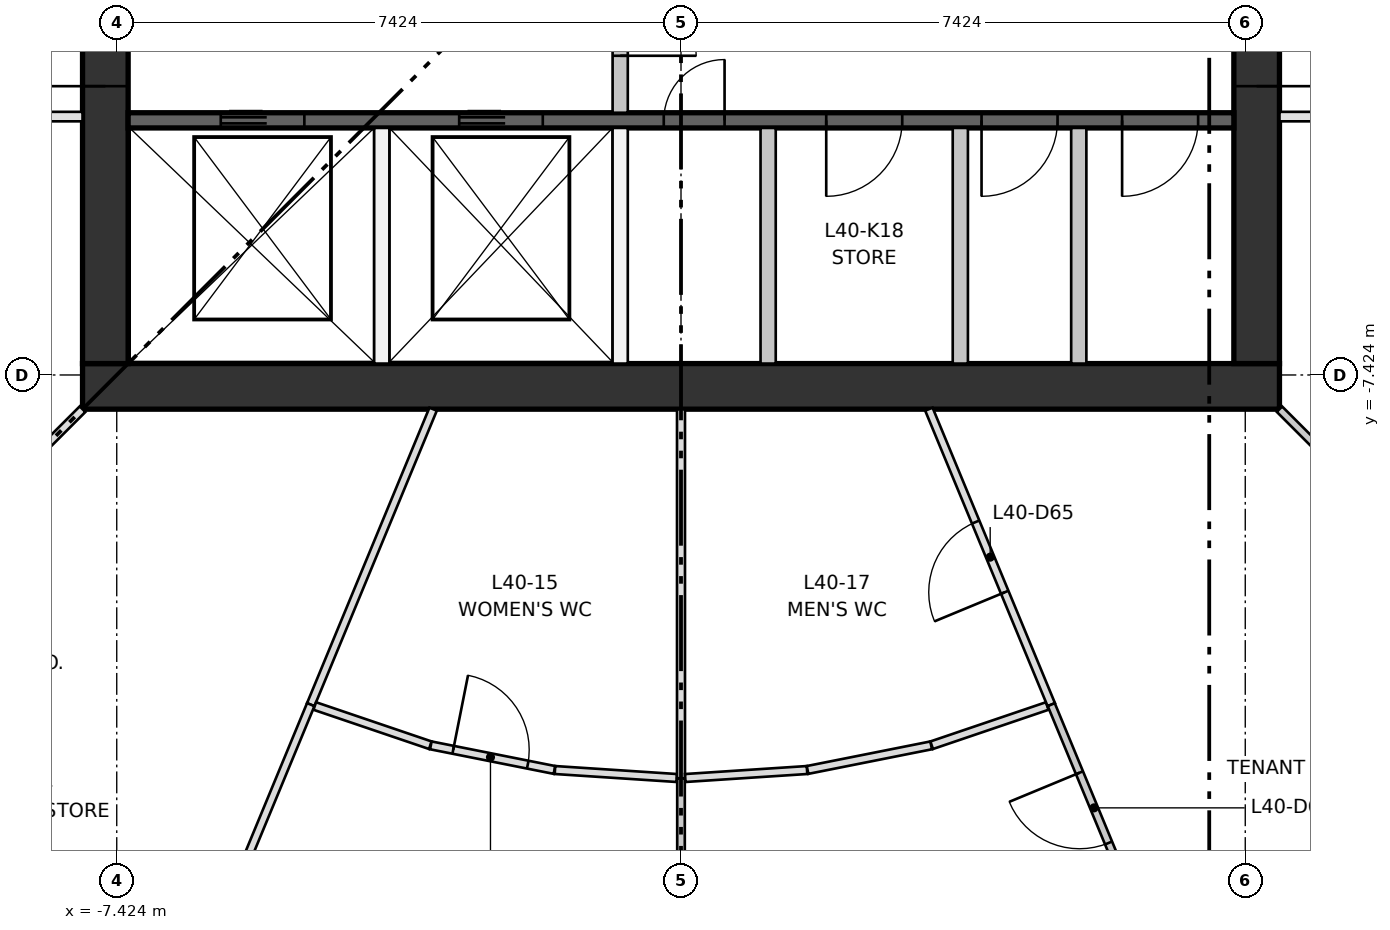
"""IFC4 building model, lengths in metres.
Left out: names, types, materials, properties, quantities, classifications, styles, units other than length and angle.
Written with IfcOpenShell. Run it as: python <this file> out.ifc"""

import sys

from ifc_helpers import new_model, si_unit, direction, frame, frame_2d, origin, place, context, subcontext, project, spatial, rectangle, extrude, element, fill, save


model = new_model("IFC4")
c1 = context("Model", 3, precision=1e-05, world=origin(), true_north=direction((0.0, 1.0)))
c2 = subcontext(c1, "Body", "Model", "MODEL_VIEW")
j1 = project(units=[si_unit("LENGTHUNIT", "METRE"), si_unit("PLANEANGLEUNIT", "RADIAN")], contexts=[c1])
p1 = place(None, origin())
s1 = spatial("IfcSite", under=j1, at=p1, CompositionType="ELEMENT")
p2 = place(p1, origin())
s2 = spatial("IfcBuilding", under=s1, at=p2, CompositionType="ELEMENT")
p3 = place(p2, frame((0.0, 0.0, 151.1)))
s3 = spatial("IfcBuildingStorey", under=s2, at=p3, CompositionType="ELEMENT", Elevation=151.1)
p4 = place(p3, frame((-7.874, -7.574, 0.0), z_axis=(0.0, 0.0, 1.0), x_axis=(1.0, 0.0, 0.0)))
e1 = element("IfcWall", 1, at=p4, inside=s3, PredefinedType="SHEAR", context=c2, shape_type="SweptSolid", body=[
    extrude(rectangle(XDim=15.748, YDim=0.6, at=frame_2d((7.874, 0.0))), origin(), (0.0, 0.0, 1.0), 3.35),
])
p5 = place(p3, frame((-7.574, -7.274, 0.0), z_axis=(0.0, 0.0, 1.0), x_axis=(0.0, 1.0, 0.0)))
e2 = element("IfcWall", 2, at=p5, inside=s3, PredefinedType="SHEAR", context=c2, shape_type="SweptSolid", body=[
    extrude(rectangle(XDim=14.548, YDim=0.6, at=frame_2d((7.274, 0.0))), origin(), (0.0, 0.0, 1.0), 3.35),
])
p6 = place(p5, frame((6.774, 0.0, 0.0)))
e3 = element("IfcOpeningElement", 3, at=p6, cuts=e2, PredefinedType="OPENING", context=c2, shape_type="SweptSolid", body=[
    extrude(rectangle(XDim=1.0, YDim=2.1, at=frame_2d((0.5, 1.05))), frame((0.0, 0.31, 0.0), z_axis=(0.0, -1.0, 0.0), x_axis=(1.0, 0.0, 0.0)), (0.0, 0.0, 1.0), 0.62),
])
p7 = place(p5, frame((3.649, 0.0, 0.0)))
e4 = element("IfcOpeningElement", 4, at=p7, cuts=e2, PredefinedType="OPENING", context=c2, shape_type="SweptSolid", body=[
    extrude(rectangle(XDim=1.8, YDim=2.1, at=frame_2d((0.9, 1.05))), frame((0.0, 0.31, 0.0), z_axis=(0.0, -1.0, 0.0), x_axis=(1.0, 0.0, 0.0)), (0.0, 0.0, 1.0), 0.62),
])
p8 = place(p5, frame((9.098, 0.0, 0.0)))
e5 = element("IfcOpeningElement", 5, at=p8, cuts=e2, PredefinedType="OPENING", context=c2, shape_type="SweptSolid", body=[
    extrude(rectangle(XDim=1.8, YDim=2.1, at=frame_2d((0.9, 1.05))), frame((0.0, 0.31, 0.0), z_axis=(0.0, -1.0, 0.0), x_axis=(1.0, 0.0, 0.0)), (0.0, 0.0, 1.0), 0.62),
])
p9 = place(p3, frame((7.574, -7.274, 0.0), z_axis=(0.0, 0.0, 1.0), x_axis=(0.0, 1.0, 0.0)))
e6 = element("IfcWall", 6, at=p9, inside=s3, PredefinedType="SHEAR", context=c2, shape_type="SweptSolid", body=[
    extrude(rectangle(XDim=14.548, YDim=0.6, at=frame_2d((7.274, 0.0))), origin(), (0.0, 0.0, 1.0), 3.35),
])
p10 = place(p9, frame((6.774, 0.0, 0.0)))
e7 = element("IfcOpeningElement", 7, at=p10, cuts=e6, PredefinedType="OPENING", context=c2, shape_type="SweptSolid", body=[
    extrude(rectangle(XDim=1.0, YDim=2.1, at=frame_2d((0.5, 1.05))), frame((0.0, 0.31, 0.0), z_axis=(0.0, -1.0, 0.0), x_axis=(1.0, 0.0, 0.0)), (0.0, 0.0, 1.0), 0.62),
])
p11 = place(p9, frame((3.649, 0.0, 0.0)))
e8 = element("IfcOpeningElement", 8, at=p11, cuts=e6, PredefinedType="OPENING", context=c2, shape_type="SweptSolid", body=[
    extrude(rectangle(XDim=1.8, YDim=2.1, at=frame_2d((0.9, 1.05))), frame((0.0, 0.31, 0.0), z_axis=(0.0, -1.0, 0.0), x_axis=(1.0, 0.0, 0.0)), (0.0, 0.0, 1.0), 0.62),
])
p12 = place(p9, frame((9.098, 0.0, 0.0)))
e9 = element("IfcOpeningElement", 9, at=p12, cuts=e6, PredefinedType="OPENING", context=c2, shape_type="SweptSolid", body=[
    extrude(rectangle(XDim=1.8, YDim=2.1, at=frame_2d((0.9, 1.05))), frame((0.0, 0.31, 0.0), z_axis=(0.0, -1.0, 0.0), x_axis=(1.0, 0.0, 0.0)), (0.0, 0.0, 1.0), 0.62),
])
p13 = place(p3, frame((-7.274, -4.074, 0.0), z_axis=(0.0, 0.0, 1.0), x_axis=(1.0, 0.0, 0.0)))
e10 = element("IfcWall", 10, at=p13, inside=s3, PredefinedType="SHEAR", context=c2, shape_type="SweptSolid", body=[
    extrude(rectangle(XDim=14.548, YDim=0.2, at=frame_2d((7.274, 0.0))), origin(), (0.0, 0.0, 1.0), 3.0),
])
p14 = place(p13, frame((1.219, 0.0, 0.0)))
e11 = element("IfcOpeningElement", 11, at=p14, cuts=e10, PredefinedType="OPENING", context=c2, shape_type="SweptSolid", body=[
    extrude(rectangle(XDim=1.1, YDim=2.1, at=frame_2d((0.55, 1.05))), frame((0.0, 0.11, 0.0), z_axis=(0.0, -1.0, 0.0), x_axis=(1.0, 0.0, 0.0)), (0.0, 0.0, 1.0), 0.22),
])
p15 = place(p13, frame((4.355, 0.0, 0.0)))
e12 = element("IfcOpeningElement", 12, at=p15, cuts=e10, PredefinedType="OPENING", context=c2, shape_type="SweptSolid", body=[
    extrude(rectangle(XDim=1.1, YDim=2.1, at=frame_2d((0.55, 1.05))), frame((0.0, 0.11, 0.0), z_axis=(0.0, -1.0, 0.0), x_axis=(1.0, 0.0, 0.0)), (0.0, 0.0, 1.0), 0.22),
])
p16 = place(p13, frame((7.047, 0.0, 0.0)))
e13 = element("IfcOpeningElement", 13, at=p16, cuts=e10, PredefinedType="OPENING", context=c2, shape_type="SweptSolid", body=[
    extrude(rectangle(XDim=0.8, YDim=2.1, at=frame_2d((0.4, 1.05))), frame((0.0, 0.11, 0.0), z_axis=(0.0, -1.0, 0.0), x_axis=(1.0, 0.0, 0.0)), (0.0, 0.0, 1.0), 0.22),
])
p17 = place(p13, frame((9.185, 0.0, 0.0)))
e14 = element("IfcOpeningElement", 14, at=p17, cuts=e10, PredefinedType="OPENING", context=c2, shape_type="SweptSolid", body=[
    extrude(rectangle(XDim=1.0, YDim=2.1, at=frame_2d((0.5, 1.05))), frame((0.0, 0.11, 0.0), z_axis=(0.0, -1.0, 0.0), x_axis=(1.0, 0.0, 0.0)), (0.0, 0.0, 1.0), 0.22),
])
p18 = place(p13, frame((11.228, 0.0, 0.0)))
e15 = element("IfcOpeningElement", 15, at=p18, cuts=e10, PredefinedType="OPENING", context=c2, shape_type="SweptSolid", body=[
    extrude(rectangle(XDim=1.0, YDim=2.1, at=frame_2d((0.5, 1.05))), frame((0.0, 0.11, 0.0), z_axis=(0.0, -1.0, 0.0), x_axis=(1.0, 0.0, 0.0)), (0.0, 0.0, 1.0), 0.22),
])
p19 = place(p13, frame((13.078, 0.0, 0.0)))
e16 = element("IfcOpeningElement", 16, at=p19, cuts=e10, PredefinedType="OPENING", context=c2, shape_type="SweptSolid", body=[
    extrude(rectangle(XDim=1.0, YDim=2.1, at=frame_2d((0.5, 1.05))), frame((0.0, 0.11, 0.0), z_axis=(0.0, -1.0, 0.0), x_axis=(1.0, 0.0, 0.0)), (0.0, 0.0, 1.0), 0.22),
])
for number, where, z_axis, x_axis in (
    (17, (-3.937, -7.274, 0.0), (0.0, 0.0, 1.0), (0.0, 1.0, 0.0)),
    (18, (-0.8, -7.274, 0.0), (0.0, 0.0, 1.0), (0.0, 1.0, 0.0)),
):
    element("IfcWall", number, at=place(p3, frame(where, z_axis=z_axis, x_axis=x_axis)), inside=s3, PredefinedType="PARTITIONING", context=c2, shape_type="SweptSolid", body=[
        extrude(rectangle(XDim=3.1, YDim=0.2, at=frame_2d((1.55, 0.0))), origin(), (0.0, 0.0, 1.0), 3.0),
    ])
p20 = place(p3, frame((-0.8, -3.974, 0.0), z_axis=(0.0, 0.0, 1.0), x_axis=(0.0, 1.0, 0.0)))
e19 = element("IfcWall", 19, at=p20, inside=s3, PredefinedType="PARTITIONING", context=c2, shape_type="SweptSolid", body=[
    extrude(rectangle(XDim=2.499, YDim=0.2, at=frame_2d((1.25, 0.0))), origin(), (0.0, 0.0, 1.0), 3.0),
])
p21 = place(p20, frame((0.75, 0.0, 0.0)))
e20 = element("IfcOpeningElement", 20, at=p21, cuts=e19, PredefinedType="OPENING", context=c2, shape_type="SweptSolid", body=[
    extrude(rectangle(XDim=1.0, YDim=2.1, at=frame_2d((0.5, 1.05))), frame((0.0, 0.11, 0.0), z_axis=(0.0, -1.0, 0.0), x_axis=(1.0, 0.0, 0.0)), (0.0, 0.0, 1.0), 0.22),
])
for number, where, z_axis, x_axis in (
    (21, (1.146, -7.274, 0.0), (0.0, 0.0, 1.0), (0.0, 1.0, 0.0)),
    (22, (3.675, -7.274, 0.0), (0.0, 0.0, 1.0), (0.0, 1.0, 0.0)),
    (23, (5.233, -7.274, 0.0), (0.0, 0.0, 1.0), (0.0, 1.0, 0.0)),
):
    element("IfcWall", number, at=place(p3, frame(where, z_axis=z_axis, x_axis=x_axis)), inside=s3, PredefinedType="PARTITIONING", context=c2, shape_type="SweptSolid", body=[
        extrude(rectangle(XDim=3.1, YDim=0.2, at=frame_2d((1.55, 0.0))), origin(), (0.0, 0.0, 1.0), 3.0),
    ])
p22 = place(p3, frame((12.91, -4.024, 0.0), z_axis=(0.0, 0.0, 1.0), x_axis=(-1.0, 0.0, 0.0)))
e24 = element("IfcWall", 24, at=p22, inside=s3, PredefinedType="PARTITIONING", context=c2, shape_type="SweptSolid", body=[
    extrude(rectangle(XDim=5.036, YDim=0.125, at=frame_2d((2.518, 0.0))), origin(), (0.0, 0.0, 1.0), 3.0),
])
p23 = place(p22, frame((2.0, 0.0, 0.0)))
e25 = element("IfcOpeningElement", 25, at=p23, cuts=e24, PredefinedType="OPENING", context=c2, shape_type="SweptSolid", body=[
    extrude(rectangle(XDim=1.0, YDim=2.1, at=frame_2d((0.5, 1.05))), frame((0.0, 0.073, 0.0), z_axis=(0.0, -1.0, 0.0), x_axis=(1.0, 0.0, 0.0)), (0.0, 0.0, 1.0), 0.145),
])
p24 = place(p3, frame((-7.874, -4.024, 0.0), z_axis=(0.0, 0.0, 1.0), x_axis=(-1.0, 0.0, 0.0)))
e26 = element("IfcWall", 26, at=p24, inside=s3, PredefinedType="PARTITIONING", context=c2, shape_type="SweptSolid", body=[
    extrude(rectangle(XDim=3.771, YDim=0.125, at=frame_2d((1.886, 0.0))), origin(), (0.0, 0.0, 1.0), 3.0),
])
p25 = place(p24, frame((1.2, 0.0, 0.0)))
e27 = element("IfcOpeningElement", 27, at=p25, cuts=e26, PredefinedType="OPENING", context=c2, shape_type="SweptSolid", body=[
    extrude(rectangle(XDim=1.0, YDim=2.1, at=frame_2d((0.5, 1.05))), frame((0.0, 0.073, 0.0), z_axis=(0.0, -1.0, 0.0), x_axis=(1.0, 0.0, 0.0)), (0.0, 0.0, 1.0), 0.145),
])
p26 = place(p3, frame((-7.874, -7.874, 0.0), z_axis=(0.0, 0.0, 1.0), x_axis=(-0.707106781187, -0.707106781187, 0.0)))
e28 = element("IfcWall", 28, at=p26, inside=s3, PredefinedType="PARTITIONING", context=c2, shape_type="SweptSolid", body=[
    extrude(rectangle(XDim=6.564, YDim=0.105, at=frame_2d((3.282, 0.0))), origin(), (0.0, 0.0, 1.0), 3.0),
])
p27 = place(p26, frame((2.5, 0.0, 0.0)))
e29 = element("IfcOpeningElement", 29, at=p27, cuts=e28, PredefinedType="OPENING", context=c2, shape_type="SweptSolid", body=[
    extrude(rectangle(XDim=1.0, YDim=2.1, at=frame_2d((0.5, 1.05))), frame((0.0, 0.062, 0.0), z_axis=(0.0, -1.0, 0.0), x_axis=(1.0, 0.0, 0.0)), (0.0, 0.0, 1.0), 0.125),
])
p28 = place(p3, frame((-3.261, -7.874, 0.0), z_axis=(0.0, 0.0, 1.0), x_axis=(-0.38269858238, -0.923873257024, 0.0)))
e30 = element("IfcWall", 30, at=p28, inside=s3, PredefinedType="PARTITIONING", context=c2, shape_type="SweptSolid", body=[
    extrude(rectangle(XDim=4.207, YDim=0.105, at=frame_2d((2.104, 0.0))), origin(), (0.0, 0.0, 1.0), 3.0),
])
p29 = place(p3, frame((-4.872, -11.761, 0.0), z_axis=(0.0, 0.0, 1.0), x_axis=(-0.38266126553, -0.923888714003, 0.0)))
e31 = element("IfcWall", 31, at=p29, inside=s3, PredefinedType="PARTITIONING", context=c2, shape_type="SweptSolid", body=[
    extrude(rectangle(XDim=4.97, YDim=0.105, at=frame_2d((2.485, 0.0))), origin(), (0.0, 0.0, 1.0), 3.0),
])
p30 = place(p3, frame((-3.298, -12.295, 0.0), z_axis=(0.0, 0.0, 1.0), x_axis=(-0.946935734923, 0.321422951771, 0.0)))
e32 = element("IfcWall", 32, at=p30, inside=s3, PredefinedType="PARTITIONING", context=c2, shape_type="SweptSolid", body=[
    extrude(rectangle(XDim=1.606, YDim=0.105, at=frame_2d((0.803, 0.0))), origin(), (0.0, 0.0, 1.0), 3.0),
])
p31 = place(p3, frame((-3.292, -12.297, 0.0), z_axis=(0.0, 0.0, 1.0), x_axis=(0.980789623675, -0.195068485645, 0.0)))
e33 = element("IfcWall", 33, at=p31, inside=s3, PredefinedType="PARTITIONING", context=c2, shape_type="SweptSolid", body=[
    extrude(rectangle(XDim=1.658, YDim=0.105, at=frame_2d((0.829, 0.0))), origin(), (0.0, 0.0, 1.0), 3.0),
])
p32 = place(p31, frame((0.3, 0.0, 0.0)))
e34 = element("IfcOpeningElement", 34, at=p32, cuts=e33, PredefinedType="OPENING", context=c2, shape_type="SweptSolid", body=[
    extrude(rectangle(XDim=1.0, YDim=2.1, at=frame_2d((0.5, 1.05))), frame((0.0, 0.062, 0.0), z_axis=(0.0, -1.0, 0.0), x_axis=(1.0, 0.0, 0.0)), (0.0, 0.0, 1.0), 0.125),
])
p33 = place(p3, frame((-0.056, -12.726, 0.0), z_axis=(0.0, 0.0, 1.0), x_axis=(-0.997860527919, 0.065378641933, 0.0)))
e35 = element("IfcWall", 35, at=p33, inside=s3, PredefinedType="PARTITIONING", context=c2, shape_type="SweptSolid", body=[
    extrude(rectangle(XDim=1.606, YDim=0.105, at=frame_2d((0.803, 0.0))), origin(), (0.0, 0.0, 1.0), 3.0),
])
p34 = place(p3, frame((0.0, -7.874, 0.0), z_axis=(0.0, 0.0, 1.0), x_axis=(0.0, -1.0, 0.0)))
e36 = element("IfcWall", 36, at=p34, inside=s3, PredefinedType="PARTITIONING", context=c2, shape_type="SweptSolid", body=[
    extrude(rectangle(XDim=4.856, YDim=0.105, at=frame_2d((2.428, 0.0))), origin(), (0.0, 0.0, 1.0), 3.0),
])
p35 = place(p3, frame((0.0, -17.7, 0.0), z_axis=(0.0, 0.0, 1.0), x_axis=(0.0, 1.0, 0.0)))
e37 = element("IfcWall", 37, at=p35, inside=s3, PredefinedType="PARTITIONING", context=c2, shape_type="SweptSolid", body=[
    extrude(rectangle(XDim=4.97, YDim=0.1, at=frame_2d((2.485, 0.0))), origin(), (0.0, 0.0, 1.0), 3.0),
])
p36 = place(p35, frame((3.0, 0.0, 0.0)))
e38 = element("IfcOpeningElement", 38, at=p36, cuts=e37, PredefinedType="OPENING", context=c2, shape_type="SweptSolid", body=[
    extrude(rectangle(XDim=1.0, YDim=2.1, at=frame_2d((0.5, 1.05))), frame((0.0, 0.06, 0.0), z_axis=(0.0, -1.0, 0.0), x_axis=(1.0, 0.0, 0.0)), (0.0, 0.0, 1.0), 0.12),
])
p37 = place(p3, frame((1.658, -12.621, 0.0), z_axis=(0.0, 0.0, 1.0), x_axis=(-0.997860527919, -0.065378641933, 0.0)))
e39 = element("IfcWall", 39, at=p37, inside=s3, PredefinedType="PARTITIONING", context=c2, shape_type="SweptSolid", body=[
    extrude(rectangle(XDim=1.606, YDim=0.105, at=frame_2d((0.803, 0.0))), origin(), (0.0, 0.0, 1.0), 3.0),
])
p38 = place(p3, frame((3.292, -12.297, 0.0), z_axis=(0.0, 0.0, 1.0), x_axis=(-0.980789623675, -0.195068485645, 0.0)))
e40 = element("IfcWall", 40, at=p38, inside=s3, PredefinedType="PARTITIONING", context=c2, shape_type="SweptSolid", body=[
    extrude(rectangle(XDim=1.658, YDim=0.105, at=frame_2d((0.829, 0.0))), origin(), (0.0, 0.0, 1.0), 3.0),
])
p39 = place(p3, frame((4.819, -11.779, 0.0), z_axis=(0.0, 0.0, 1.0), x_axis=(-0.946935734923, -0.321422951771, 0.0)))
e41 = element("IfcWall", 41, at=p39, inside=s3, PredefinedType="PARTITIONING", context=c2, shape_type="SweptSolid", body=[
    extrude(rectangle(XDim=1.606, YDim=0.105, at=frame_2d((0.803, 0.0))), origin(), (0.0, 0.0, 1.0), 3.0),
])
p40 = place(p3, frame((4.872, -11.761, 0.0), z_axis=(0.0, 0.0, 1.0), x_axis=(-0.38269858238, 0.923873257024, 0.0)))
e42 = element("IfcWall", 42, at=p40, inside=s3, PredefinedType="PARTITIONING", context=c2, shape_type="SweptSolid", body=[
    extrude(rectangle(XDim=4.207, YDim=0.105, at=frame_2d((2.104, 0.0))), origin(), (0.0, 0.0, 1.0), 3.0),
])
p41 = place(p40, frame((1.6, 0.0, 0.0)))
e43 = element("IfcOpeningElement", 43, at=p41, cuts=e42, PredefinedType="OPENING", context=c2, shape_type="SweptSolid", body=[
    extrude(rectangle(XDim=1.0, YDim=2.1, at=frame_2d((0.5, 1.05))), frame((0.0, 0.062, 0.0), z_axis=(0.0, -1.0, 0.0), x_axis=(1.0, 0.0, 0.0)), (0.0, 0.0, 1.0), 0.125),
])
p42 = place(p3, frame((6.773, -16.353, 0.0), z_axis=(0.0, 0.0, 1.0), x_axis=(-0.38266126553, 0.923888714003, 0.0)))
e44 = element("IfcWall", 44, at=p42, inside=s3, PredefinedType="PARTITIONING", context=c2, shape_type="SweptSolid", body=[
    extrude(rectangle(XDim=4.97, YDim=0.1, at=frame_2d((2.485, 0.0))), origin(), (0.0, 0.0, 1.0), 3.0),
])
p43 = place(p42, frame((3.0, 0.0, 0.0)))
e45 = element("IfcOpeningElement", 45, at=p43, cuts=e44, PredefinedType="OPENING", context=c2, shape_type="SweptSolid", body=[
    extrude(rectangle(XDim=1.0, YDim=2.1, at=frame_2d((0.5, 1.05))), frame((0.0, 0.06, 0.0), z_axis=(0.0, -1.0, 0.0), x_axis=(1.0, 0.0, 0.0)), (0.0, 0.0, 1.0), 0.12),
])
p44 = place(p3, frame((12.516, -12.516, 0.0), z_axis=(0.0, 0.0, 1.0), x_axis=(-0.707106781187, 0.707106781187, 0.0)))
e46 = element("IfcWall", 46, at=p44, inside=s3, PredefinedType="PARTITIONING", context=c2, shape_type="SweptSolid", body=[
    extrude(rectangle(XDim=6.564, YDim=0.1, at=frame_2d((3.282, 0.0))), origin(), (0.0, 0.0, 1.0), 3.0),
])
p45 = place(p44, frame((3.0, 0.0, 0.0)))
e47 = element("IfcOpeningElement", 47, at=p45, cuts=e46, PredefinedType="OPENING", context=c2, shape_type="SweptSolid", body=[
    extrude(rectangle(XDim=1.0, YDim=2.1, at=frame_2d((0.5, 1.05))), frame((0.0, 0.06, 0.0), z_axis=(0.0, -1.0, 0.0), x_axis=(1.0, 0.0, 0.0)), (0.0, 0.0, 1.0), 0.12),
])
p46 = place(p14, origin())
e48 = element("IfcDoor", 48, at=p46, inside=s3, OperationType="DOUBLE_DOOR_SLIDING", PredefinedType="DOOR", context=c2, shape_type="SweptSolid", body=[
    extrude(rectangle(XDim=1.1, YDim=2.1, at=frame_2d((0.55, 1.05))), frame((0.0, 0.025, 0.0), z_axis=(0.0, -1.0, 0.0), x_axis=(1.0, 0.0, 0.0)), (0.0, 0.0, 1.0), 0.05),
])
fill(e11, e48)
p47 = place(p15, origin())
e49 = element("IfcDoor", 49, at=p47, inside=s3, OperationType="DOUBLE_DOOR_SLIDING", PredefinedType="DOOR", context=c2, shape_type="SweptSolid", body=[
    extrude(rectangle(XDim=1.1, YDim=2.1, at=frame_2d((0.55, 1.05))), frame((0.0, 0.025, 0.0), z_axis=(0.0, -1.0, 0.0), x_axis=(1.0, 0.0, 0.0)), (0.0, 0.0, 1.0), 0.05),
])
fill(e12, e49)
p48 = place(p21, frame((1.0, 0.0, 0.0), z_axis=(0.0, 0.0, 1.0), x_axis=(-1.0, 0.0, 0.0)))
e50 = element("IfcDoor", 50, at=p48, inside=s3, OperationType="SINGLE_SWING_LEFT", PredefinedType="DOOR", context=c2, shape_type="SweptSolid", body=[
    extrude(rectangle(XDim=1.0, YDim=2.1, at=frame_2d((0.5, 1.05))), frame((0.0, 0.025, 0.0), z_axis=(0.0, -1.0, 0.0), x_axis=(1.0, 0.0, 0.0)), (0.0, 0.0, 1.0), 0.05),
])
fill(e20, e50)
p49 = place(p16, origin())
e51 = element("IfcDoor", 51, at=p49, inside=s3, OperationType="SINGLE_SWING_RIGHT", PredefinedType="DOOR", context=c2, shape_type="SweptSolid", body=[
    extrude(rectangle(XDim=0.8, YDim=2.1, at=frame_2d((0.4, 1.05))), frame((0.0, 0.025, 0.0), z_axis=(0.0, -1.0, 0.0), x_axis=(1.0, 0.0, 0.0)), (0.0, 0.0, 1.0), 0.05),
])
fill(e13, e51)
p50 = place(p17, frame((1.0, 0.0, 0.0), z_axis=(0.0, 0.0, 1.0), x_axis=(-1.0, 0.0, 0.0)))
e52 = element("IfcDoor", 52, at=p50, inside=s3, OperationType="SINGLE_SWING_LEFT", PredefinedType="DOOR", context=c2, shape_type="SweptSolid", body=[
    extrude(rectangle(XDim=1.0, YDim=2.1, at=frame_2d((0.5, 1.05))), frame((0.0, 0.025, 0.0), z_axis=(0.0, -1.0, 0.0), x_axis=(1.0, 0.0, 0.0)), (0.0, 0.0, 1.0), 0.05),
])
fill(e14, e52)
p51 = place(p18, frame((1.0, 0.0, 0.0), z_axis=(0.0, 0.0, 1.0), x_axis=(-1.0, 0.0, 0.0)))
e53 = element("IfcDoor", 53, at=p51, inside=s3, OperationType="SINGLE_SWING_LEFT", PredefinedType="DOOR", context=c2, shape_type="SweptSolid", body=[
    extrude(rectangle(XDim=1.0, YDim=2.1, at=frame_2d((0.5, 1.05))), frame((0.0, 0.025, 0.0), z_axis=(0.0, -1.0, 0.0), x_axis=(1.0, 0.0, 0.0)), (0.0, 0.0, 1.0), 0.05),
])
fill(e15, e53)
p52 = place(p19, frame((1.0, 0.0, 0.0), z_axis=(0.0, 0.0, 1.0), x_axis=(-1.0, 0.0, 0.0)))
e54 = element("IfcDoor", 54, at=p52, inside=s3, OperationType="SINGLE_SWING_LEFT", PredefinedType="DOOR", context=c2, shape_type="SweptSolid", body=[
    extrude(rectangle(XDim=1.0, YDim=2.1, at=frame_2d((0.5, 1.05))), frame((0.0, 0.025, 0.0), z_axis=(0.0, -1.0, 0.0), x_axis=(1.0, 0.0, 0.0)), (0.0, 0.0, 1.0), 0.05),
])
fill(e16, e54)
p53 = place(p7, origin())
e55 = element("IfcDoor", 55, at=p53, inside=s3, OperationType="DOUBLE_DOOR_SINGLE_SWING", PredefinedType="DOOR", context=c2, shape_type="SweptSolid", body=[
    extrude(rectangle(XDim=1.8, YDim=2.1, at=frame_2d((0.9, 1.05))), frame((0.0, 0.025, 0.0), z_axis=(0.0, -1.0, 0.0), x_axis=(1.0, 0.0, 0.0)), (0.0, 0.0, 1.0), 0.05),
])
fill(e4, e55)
p54 = place(p11, frame((1.8, 0.0, 0.0), z_axis=(0.0, 0.0, 1.0), x_axis=(-1.0, 0.0, 0.0)))
e56 = element("IfcDoor", 56, at=p54, inside=s3, OperationType="DOUBLE_DOOR_SINGLE_SWING", PredefinedType="DOOR", context=c2, shape_type="SweptSolid", body=[
    extrude(rectangle(XDim=1.8, YDim=2.1, at=frame_2d((0.9, 1.05))), frame((0.0, 0.025, 0.0), z_axis=(0.0, -1.0, 0.0), x_axis=(1.0, 0.0, 0.0)), (0.0, 0.0, 1.0), 0.05),
])
fill(e8, e56)
p55 = place(p32, origin())
e57 = element("IfcDoor", 57, at=p55, inside=s3, OperationType="SINGLE_SWING_LEFT", PredefinedType="DOOR", context=c2, shape_type="SweptSolid", body=[
    extrude(rectangle(XDim=1.0, YDim=2.1, at=frame_2d((0.5, 1.05))), frame((0.0, 0.025, 0.0), z_axis=(0.0, -1.0, 0.0), x_axis=(1.0, 0.0, 0.0)), (0.0, 0.0, 1.0), 0.05),
])
fill(e34, e57)
p56 = place(p41, origin())
e58 = element("IfcDoor", 58, at=p56, inside=s3, OperationType="SINGLE_SWING_LEFT", PredefinedType="DOOR", context=c2, shape_type="SweptSolid", body=[
    extrude(rectangle(XDim=1.0, YDim=2.1, at=frame_2d((0.5, 1.05))), frame((0.0, 0.025, 0.0), z_axis=(0.0, -1.0, 0.0), x_axis=(1.0, 0.0, 0.0)), (0.0, 0.0, 1.0), 0.05),
])
fill(e43, e58)
p57 = place(p43, origin())
e59 = element("IfcDoor", 59, at=p57, inside=s3, OperationType="SINGLE_SWING_RIGHT", PredefinedType="DOOR", context=c2, shape_type="SweptSolid", body=[
    extrude(rectangle(XDim=1.0, YDim=2.1, at=frame_2d((0.5, 1.05))), frame((0.0, 0.025, 0.0), z_axis=(0.0, -1.0, 0.0), x_axis=(1.0, 0.0, 0.0)), (0.0, 0.0, 1.0), 0.05),
])
fill(e45, e59)
save(model, sys.argv[1])
